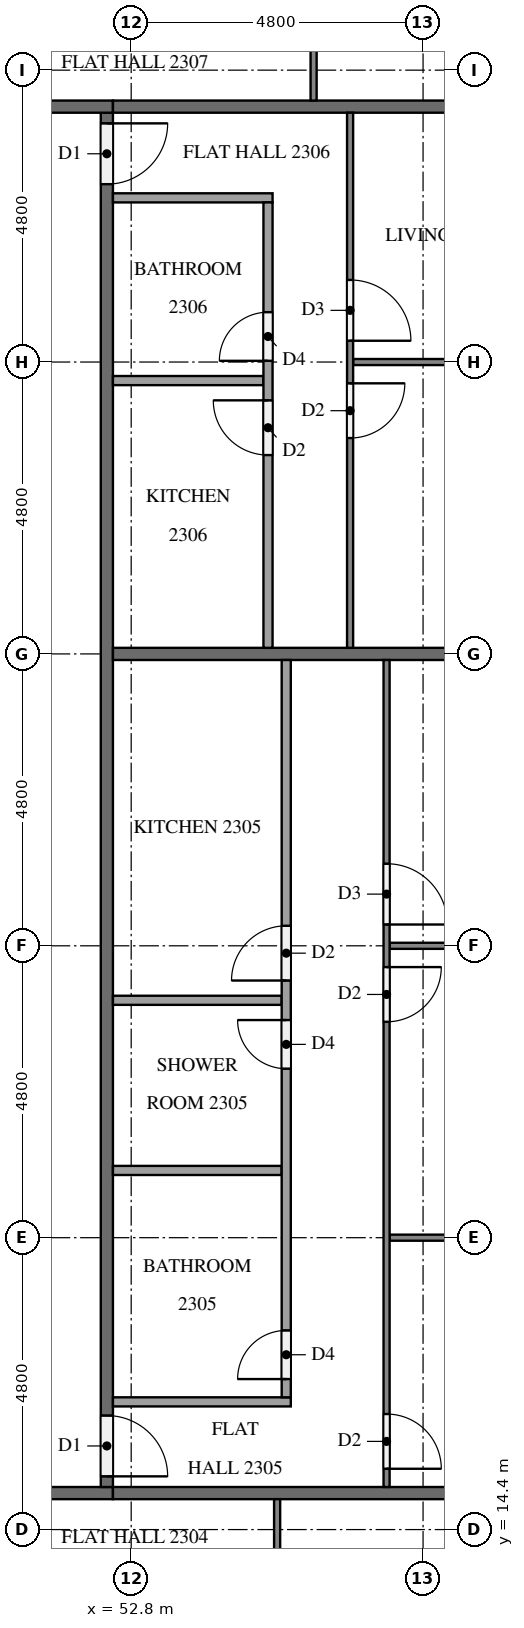
"""IFC4 building model, lengths in metres.
Left out: names, types, materials, properties, quantities, classifications, styles, units other than length and angle.
Written with IfcOpenShell. Run it as: python <this file> out.ifc"""

import sys

from ifc_helpers import new_model, si_unit, direction, frame, frame_2d, origin, place, context, subcontext, project, spatial, rectangle, extrude, element, fill, save


model = new_model("IFC4")
c1 = context("Model", 3, precision=1e-05, world=origin(), true_north=direction((0.0, 1.0)))
c2 = subcontext(c1, "Body", "Model", "MODEL_VIEW")
j1 = project(units=[si_unit("LENGTHUNIT", "METRE"), si_unit("PLANEANGLEUNIT", "RADIAN")], contexts=[c1])
p1 = place(None, origin())
s1 = spatial("IfcSite", under=j1, at=p1, CompositionType="ELEMENT")
p2 = place(p1, origin())
s2 = spatial("IfcBuilding", under=s1, at=p2, CompositionType="ELEMENT")
p3 = place(p2, frame((0.0, 0.0, 92.7)))
s3 = spatial("IfcBuildingStorey", under=s2, at=p3, CompositionType="ELEMENT", Elevation=92.7)
p4 = place(p3, frame((50.3, 15.0, 0.0), z_axis=(0.0, 0.0, 1.0), x_axis=(1.0, 0.0, 0.0)))
e1 = element("IfcWall", 1, at=p4, inside=s3, PredefinedType="PARTITIONING", context=c2, shape_type="SweptSolid", body=[
    extrude(rectangle(XDim=2.2, YDim=0.2, at=frame_2d((1.1, 0.0))), origin(), (0.0, 0.0, 1.0), 3.2),
])
p5 = place(p3, frame((52.4, 37.7, 0.0), z_axis=(0.0, 0.0, 1.0), x_axis=(0.0, -1.0, 0.0)))
e2 = element("IfcWall", 2, at=p5, inside=s3, PredefinedType="PARTITIONING", context=c2, shape_type="SweptSolid", body=[
    extrude(rectangle(XDim=22.6, YDim=0.2, at=frame_2d((11.3, 0.0))), origin(), (0.0, 0.0, 1.0), 3.2),
])
p6 = place(p5, frame((21.425, 0.0, 0.0)))
e3 = element("IfcOpeningElement", 3, at=p6, cuts=e2, PredefinedType="OPENING", context=c2, shape_type="SweptSolid", body=[
    extrude(rectangle(XDim=1.0, YDim=2.1, at=frame_2d((0.5, 1.05))), frame((0.0, 0.11, 0.0), z_axis=(0.0, -1.0, 0.0), x_axis=(1.0, 0.0, 0.0)), (0.0, 0.0, 1.0), 0.22),
])
p7 = place(p5, frame((0.175, 0.0, 0.0)))
e4 = element("IfcOpeningElement", 4, at=p7, cuts=e2, PredefinedType="OPENING", context=c2, shape_type="SweptSolid", body=[
    extrude(rectangle(XDim=1.0, YDim=2.1, at=frame_2d((0.5, 1.05))), frame((0.0, 0.11, 0.0), z_axis=(0.0, -1.0, 0.0), x_axis=(1.0, 0.0, 0.0)), (0.0, 0.0, 1.0), 0.22),
])
p8 = place(p3, frame((52.5, 37.8, 0.0), z_axis=(0.0, 0.0, 1.0), x_axis=(-1.0, 0.0, 0.0)))
e5 = element("IfcWall", 5, at=p8, inside=s3, PredefinedType="PARTITIONING", context=c2, shape_type="SweptSolid", body=[
    extrude(rectangle(XDim=2.2, YDim=0.2, at=frame_2d((1.1, 0.0))), origin(), (0.0, 0.0, 1.0), 3.2),
])
p9 = place(p3, frame((52.5, 15.0, 0.0), z_axis=(0.0, 0.0, 1.0), x_axis=(1.0, 0.0, 0.0)))
e6 = element("IfcWall", 6, at=p9, inside=s3, PredefinedType="PARTITIONING", context=c2, shape_type="SweptSolid", body=[
    extrude(rectangle(XDim=9.8, YDim=0.2, at=frame_2d((4.9, 0.0))), origin(), (0.0, 0.0, 1.0), 3.2),
])
for number, where, z_axis, x_axis in (
    (7, (52.5, 28.8, 0.0), (0.0, 0.0, 1.0), (1.0, 0.0, 0.0)),
    (8, (52.5, 37.8, 0.0), (0.0, 0.0, 1.0), (1.0, 0.0, 0.0)),
):
    element("IfcWall", number, at=place(p3, frame(where, z_axis=z_axis, x_axis=x_axis)), inside=s3, PredefinedType="PARTITIONING", context=c2, shape_type="SweptSolid", body=[
        extrude(rectangle(XDim=9.475, YDim=0.2, at=frame_2d((4.738, 0.0))), origin(), (0.0, 0.0, 1.0), 3.2),
    ])
p10 = place(p3, frame((55.2, 14.9, 0.0), z_axis=(0.0, 0.0, 1.0), x_axis=(0.0, -1.0, 0.0)))
e9 = element("IfcWall", 9, at=p10, inside=s3, PredefinedType="PARTITIONING", context=c2, shape_type="SweptSolid", body=[
    extrude(rectangle(XDim=10.0, YDim=0.1, at=frame_2d((5.0, 0.0))), origin(), (0.0, 0.0, 1.0), 3.2),
])
p11 = place(p10, frame((4.05, 0.0, 0.0)))
e10 = element("IfcOpeningElement", 10, at=p11, cuts=e9, PredefinedType="OPENING", context=c2, shape_type="SweptSolid", body=[
    extrude(rectangle(XDim=0.9, YDim=2.1, at=frame_2d((0.45, 1.05))), frame((0.0, 0.06, 0.0), z_axis=(0.0, -1.0, 0.0), x_axis=(1.0, 0.0, 0.0)), (0.0, 0.0, 1.0), 0.12),
])
p12 = place(p10, frame((5.65, 0.0, 0.0)))
e11 = element("IfcOpeningElement", 11, at=p12, cuts=e9, PredefinedType="OPENING", context=c2, shape_type="SweptSolid", body=[
    extrude(rectangle(XDim=1.0, YDim=2.1, at=frame_2d((0.5, 1.05))), frame((0.0, 0.06, 0.0), z_axis=(0.0, -1.0, 0.0), x_axis=(1.0, 0.0, 0.0)), (0.0, 0.0, 1.0), 0.12),
])
p13 = place(p3, frame((57.05, 19.2, 0.0), z_axis=(0.0, 0.0, 1.0), x_axis=(1.0, 0.0, 0.0)))
e12 = element("IfcWall", 12, at=p13, inside=s3, PredefinedType="PARTITIONING", context=c2, shape_type="SweptSolid", body=[
    extrude(rectangle(XDim=4.925, YDim=0.1, at=frame_2d((2.462, 0.0))), origin(), (0.0, 0.0, 1.0), 3.2),
])
p14 = place(p3, frame((57.05, 24.0, 0.0), z_axis=(0.0, 0.0, 1.0), x_axis=(1.0, 0.0, 0.0)))
e13 = element("IfcWall", 13, at=p14, inside=s3, PredefinedType="PARTITIONING", context=c2, shape_type="SweptSolid", body=[
    extrude(rectangle(XDim=5.25, YDim=0.1, at=frame_2d((2.625, 0.0))), origin(), (0.0, 0.0, 1.0), 3.2),
])
p15 = place(p3, frame((57.0, 28.7, 0.0), z_axis=(0.0, 0.0, 1.0), x_axis=(0.0, -1.0, 0.0)))
e14 = element("IfcWall", 14, at=p15, inside=s3, PredefinedType="PARTITIONING", context=c2, shape_type="SweptSolid", body=[
    extrude(rectangle(XDim=13.6, YDim=0.1, at=frame_2d((6.8, 0.0))), origin(), (0.0, 0.0, 1.0), 3.2),
])
p16 = place(p15, frame((12.4, 0.0, 0.0)))
e15 = element("IfcOpeningElement", 15, at=p16, cuts=e14, PredefinedType="OPENING", context=c2, shape_type="SweptSolid", body=[
    extrude(rectangle(XDim=0.9, YDim=2.1, at=frame_2d((0.45, 1.05))), frame((0.0, 0.06, 0.0), z_axis=(0.0, -1.0, 0.0), x_axis=(1.0, 0.0, 0.0)), (0.0, 0.0, 1.0), 0.12),
])
p17 = place(p15, frame((5.05, 0.0, 0.0)))
e16 = element("IfcOpeningElement", 16, at=p17, cuts=e14, PredefinedType="OPENING", context=c2, shape_type="SweptSolid", body=[
    extrude(rectangle(XDim=0.9, YDim=2.1, at=frame_2d((0.45, 1.05))), frame((0.0, 0.06, 0.0), z_axis=(0.0, -1.0, 0.0), x_axis=(1.0, 0.0, 0.0)), (0.0, 0.0, 1.0), 0.12),
])
p18 = place(p15, frame((3.35, 0.0, 0.0)))
e17 = element("IfcOpeningElement", 17, at=p18, cuts=e14, PredefinedType="OPENING", context=c2, shape_type="SweptSolid", body=[
    extrude(rectangle(XDim=1.0, YDim=2.1, at=frame_2d((0.5, 1.05))), frame((0.0, 0.06, 0.0), z_axis=(0.0, -1.0, 0.0), x_axis=(1.0, 0.0, 0.0)), (0.0, 0.0, 1.0), 0.12),
])
for number, where, z_axis, x_axis in (
    (18, (52.5, 20.306, 0.0), (0.0, 0.0, 1.0), (1.0, 0.0, 0.0)),
    (19, (52.5, 23.104, 0.0), (0.0, 0.0, 1.0), (1.0, 0.0, 0.0)),
):
    element("IfcWall", number, at=place(p3, frame(where, z_axis=z_axis, x_axis=x_axis)), inside=s3, PredefinedType="PARTITIONING", context=c2, shape_type="SweptSolid", body=[
        extrude(rectangle(XDim=2.775, YDim=0.15, at=frame_2d((1.387, 0.0))), origin(), (0.0, 0.0, 1.0), 3.2),
    ])
p19 = place(p3, frame((52.5, 16.5, 0.0), z_axis=(0.0, 0.0, 1.0), x_axis=(1.0, 0.0, 0.0)))
e20 = element("IfcWall", 20, at=p19, inside=s3, PredefinedType="PARTITIONING", context=c2, shape_type="SweptSolid", body=[
    extrude(rectangle(XDim=2.925, YDim=0.15, at=frame_2d((1.462, 0.0))), origin(), (0.0, 0.0, 1.0), 3.2),
])
p20 = place(p3, frame((55.35, 16.575, 0.0), z_axis=(0.0, 0.0, 1.0), x_axis=(0.0, 1.0, 0.0)))
e21 = element("IfcWall", 21, at=p20, inside=s3, PredefinedType="PARTITIONING", context=c2, shape_type="SweptSolid", body=[
    extrude(rectangle(XDim=12.125, YDim=0.15, at=frame_2d((6.062, 0.0))), origin(), (0.0, 0.0, 1.0), 3.2),
])
p21 = place(p20, frame((0.3, 0.0, 0.0)))
e22 = element("IfcOpeningElement", 22, at=p21, cuts=e21, PredefinedType="OPENING", context=c2, shape_type="SweptSolid", body=[
    extrude(rectangle(XDim=0.8, YDim=2.1, at=frame_2d((0.4, 1.05))), frame((0.0, 0.085, 0.0), z_axis=(0.0, -1.0, 0.0), x_axis=(1.0, 0.0, 0.0)), (0.0, 0.0, 1.0), 0.17),
])
p22 = place(p20, frame((5.404, 0.0, 0.0)))
e23 = element("IfcOpeningElement", 23, at=p22, cuts=e21, PredefinedType="OPENING", context=c2, shape_type="SweptSolid", body=[
    extrude(rectangle(XDim=0.8, YDim=2.1, at=frame_2d((0.4, 1.05))), frame((0.0, 0.085, 0.0), z_axis=(0.0, -1.0, 0.0), x_axis=(1.0, 0.0, 0.0)), (0.0, 0.0, 1.0), 0.17),
])
p23 = place(p20, frame((6.854, 0.0, 0.0)))
e24 = element("IfcOpeningElement", 24, at=p23, cuts=e21, PredefinedType="OPENING", context=c2, shape_type="SweptSolid", body=[
    extrude(rectangle(XDim=0.9, YDim=2.1, at=frame_2d((0.45, 1.05))), frame((0.0, 0.085, 0.0), z_axis=(0.0, -1.0, 0.0), x_axis=(1.0, 0.0, 0.0)), (0.0, 0.0, 1.0), 0.17),
])
p24 = place(p3, frame((56.45, 33.6, 0.0), z_axis=(0.0, 0.0, 1.0), x_axis=(1.0, 0.0, 0.0)))
e25 = element("IfcWall", 25, at=p24, inside=s3, PredefinedType="PARTITIONING", context=c2, shape_type="SweptSolid", body=[
    extrude(rectangle(XDim=5.85, YDim=0.1, at=frame_2d((2.925, 0.0))), origin(), (0.0, 0.0, 1.0), 3.2),
])
p25 = place(p3, frame((56.4, 37.7, 0.0), z_axis=(0.0, 0.0, 1.0), x_axis=(0.0, -1.0, 0.0)))
e26 = element("IfcWall", 26, at=p25, inside=s3, PredefinedType="PARTITIONING", context=c2, shape_type="SweptSolid", body=[
    extrude(rectangle(XDim=8.8, YDim=0.1, at=frame_2d((4.4, 0.0))), origin(), (0.0, 0.0, 1.0), 3.2),
])
p26 = place(p25, frame((2.75, 0.0, 0.0)))
e27 = element("IfcOpeningElement", 27, at=p26, cuts=e26, PredefinedType="OPENING", context=c2, shape_type="SweptSolid", body=[
    extrude(rectangle(XDim=1.0, YDim=2.1, at=frame_2d((0.5, 1.05))), frame((0.0, 0.06, 0.0), z_axis=(0.0, -1.0, 0.0), x_axis=(1.0, 0.0, 0.0)), (0.0, 0.0, 1.0), 0.12),
])
p27 = place(p25, frame((4.45, 0.0, 0.0)))
e28 = element("IfcOpeningElement", 28, at=p27, cuts=e26, PredefinedType="OPENING", context=c2, shape_type="SweptSolid", body=[
    extrude(rectangle(XDim=0.9, YDim=2.1, at=frame_2d((0.45, 1.05))), frame((0.0, 0.06, 0.0), z_axis=(0.0, -1.0, 0.0), x_axis=(1.0, 0.0, 0.0)), (0.0, 0.0, 1.0), 0.12),
])
p28 = place(p3, frame((52.5, 33.295, 0.0), z_axis=(0.0, 0.0, 1.0), x_axis=(1.0, 0.0, 0.0)))
e29 = element("IfcWall", 29, at=p28, inside=s3, PredefinedType="PARTITIONING", context=c2, shape_type="SweptSolid", body=[
    extrude(rectangle(XDim=2.475, YDim=0.15, at=frame_2d((1.238, 0.0))), origin(), (0.0, 0.0, 1.0), 3.2),
])
p29 = place(p3, frame((52.5, 36.3, 0.0), z_axis=(0.0, 0.0, 1.0), x_axis=(1.0, 0.0, 0.0)))
e30 = element("IfcWall", 30, at=p29, inside=s3, PredefinedType="PARTITIONING", context=c2, shape_type="SweptSolid", body=[
    extrude(rectangle(XDim=2.625, YDim=0.15, at=frame_2d((1.312, 0.0))), origin(), (0.0, 0.0, 1.0), 3.2),
])
p30 = place(p3, frame((55.05, 28.9, 0.0), z_axis=(0.0, 0.0, 1.0), x_axis=(0.0, 1.0, 0.0)))
e31 = element("IfcWall", 31, at=p30, inside=s3, PredefinedType="PARTITIONING", context=c2, shape_type="SweptSolid", body=[
    extrude(rectangle(XDim=7.325, YDim=0.15, at=frame_2d((3.663, 0.0))), origin(), (0.0, 0.0, 1.0), 3.2),
])
p31 = place(p30, frame((4.72, 0.0, 0.0)))
e32 = element("IfcOpeningElement", 32, at=p31, cuts=e31, PredefinedType="OPENING", context=c2, shape_type="SweptSolid", body=[
    extrude(rectangle(XDim=0.8, YDim=2.1, at=frame_2d((0.4, 1.05))), frame((0.0, 0.085, 0.0), z_axis=(0.0, -1.0, 0.0), x_axis=(1.0, 0.0, 0.0)), (0.0, 0.0, 1.0), 0.17),
])
p32 = place(p30, frame((3.17, 0.0, 0.0)))
e33 = element("IfcOpeningElement", 33, at=p32, cuts=e31, PredefinedType="OPENING", context=c2, shape_type="SweptSolid", body=[
    extrude(rectangle(XDim=0.9, YDim=2.1, at=frame_2d((0.45, 1.05))), frame((0.0, 0.085, 0.0), z_axis=(0.0, -1.0, 0.0), x_axis=(1.0, 0.0, 0.0)), (0.0, 0.0, 1.0), 0.17),
])
p33 = place(p3, frame((55.8, 52.7, 0.0), z_axis=(0.0, 0.0, 1.0), x_axis=(0.0, -1.0, 0.0)))
e34 = element("IfcWall", 34, at=p33, inside=s3, PredefinedType="PARTITIONING", context=c2, shape_type="SweptSolid", body=[
    extrude(rectangle(XDim=14.8, YDim=0.1, at=frame_2d((7.4, 0.0))), origin(), (0.0, 0.0, 1.0), 3.2),
])
p34 = place(p33, frame((9.85, 0.0, 0.0)))
e35 = element("IfcOpeningElement", 35, at=p34, cuts=e34, PredefinedType="OPENING", context=c2, shape_type="SweptSolid", body=[
    extrude(rectangle(XDim=0.9, YDim=2.1, at=frame_2d((0.45, 1.05))), frame((0.0, 0.06, 0.0), z_axis=(0.0, -1.0, 0.0), x_axis=(1.0, 0.0, 0.0)), (0.0, 0.0, 1.0), 0.12),
])
p35 = place(p33, frame((8.25, 0.0, 0.0)))
e36 = element("IfcOpeningElement", 36, at=p35, cuts=e34, PredefinedType="OPENING", context=c2, shape_type="SweptSolid", body=[
    extrude(rectangle(XDim=0.9, YDim=2.1, at=frame_2d((0.45, 1.05))), frame((0.0, 0.06, 0.0), z_axis=(0.0, -1.0, 0.0), x_axis=(1.0, 0.0, 0.0)), (0.0, 0.0, 1.0), 0.12),
])
p36 = place(p33, frame((0.5, 0.0, 0.0)))
e37 = element("IfcOpeningElement", 37, at=p36, cuts=e34, PredefinedType="OPENING", context=c2, shape_type="SweptSolid", body=[
    extrude(rectangle(XDim=1.0, YDim=2.1, at=frame_2d((0.5, 1.05))), frame((0.0, 0.06, 0.0), z_axis=(0.0, -1.0, 0.0), x_axis=(1.0, 0.0, 0.0)), (0.0, 0.0, 1.0), 0.12),
])
p37 = place(p6, origin())
e38 = element("IfcDoor", 38, at=p37, inside=s3, OperationType="SINGLE_SWING_RIGHT", PredefinedType="DOOR", context=c2, shape_type="SweptSolid", body=[
    extrude(rectangle(XDim=1.0, YDim=2.1, at=frame_2d((0.5, 1.05))), frame((0.0, 0.025, 0.0), z_axis=(0.0, -1.0, 0.0), x_axis=(1.0, 0.0, 0.0)), (0.0, 0.0, 1.0), 0.05),
])
fill(e3, e38)
p38 = place(p7, origin())
e39 = element("IfcDoor", 39, at=p38, inside=s3, OperationType="SINGLE_SWING_LEFT", PredefinedType="DOOR", context=c2, shape_type="SweptSolid", body=[
    extrude(rectangle(XDim=1.0, YDim=2.1, at=frame_2d((0.5, 1.05))), frame((0.0, 0.025, 0.0), z_axis=(0.0, -1.0, 0.0), x_axis=(1.0, 0.0, 0.0)), (0.0, 0.0, 1.0), 0.05),
])
fill(e4, e39)
p39 = place(p16, origin())
e40 = element("IfcDoor", 40, at=p39, inside=s3, OperationType="SINGLE_SWING_RIGHT", PredefinedType="DOOR", context=c2, shape_type="SweptSolid", body=[
    extrude(rectangle(XDim=0.9, YDim=2.1, at=frame_2d((0.45, 1.05))), frame((0.0, 0.025, 0.0), z_axis=(0.0, -1.0, 0.0), x_axis=(1.0, 0.0, 0.0)), (0.0, 0.0, 1.0), 0.05),
])
fill(e15, e40)
p40 = place(p17, origin())
e41 = element("IfcDoor", 41, at=p40, inside=s3, OperationType="SINGLE_SWING_LEFT", PredefinedType="DOOR", context=c2, shape_type="SweptSolid", body=[
    extrude(rectangle(XDim=0.9, YDim=2.1, at=frame_2d((0.45, 1.05))), frame((0.0, 0.025, 0.0), z_axis=(0.0, -1.0, 0.0), x_axis=(1.0, 0.0, 0.0)), (0.0, 0.0, 1.0), 0.05),
])
fill(e16, e41)
p41 = place(p18, origin())
e42 = element("IfcDoor", 42, at=p41, inside=s3, OperationType="SINGLE_SWING_RIGHT", PredefinedType="DOOR", context=c2, shape_type="SweptSolid", body=[
    extrude(rectangle(XDim=1.0, YDim=2.1, at=frame_2d((0.5, 1.05))), frame((0.0, 0.025, 0.0), z_axis=(0.0, -1.0, 0.0), x_axis=(1.0, 0.0, 0.0)), (0.0, 0.0, 1.0), 0.05),
])
fill(e17, e42)
p42 = place(p21, origin())
e43 = element("IfcDoor", 43, at=p42, inside=s3, OperationType="SINGLE_SWING_LEFT", PredefinedType="DOOR", context=c2, shape_type="SweptSolid", body=[
    extrude(rectangle(XDim=0.8, YDim=2.1, at=frame_2d((0.4, 1.05))), frame((0.0, 0.025, 0.0), z_axis=(0.0, -1.0, 0.0), x_axis=(1.0, 0.0, 0.0)), (0.0, 0.0, 1.0), 0.05),
])
fill(e22, e43)
p43 = place(p22, origin())
e44 = element("IfcDoor", 44, at=p43, inside=s3, OperationType="SINGLE_SWING_RIGHT", PredefinedType="DOOR", context=c2, shape_type="SweptSolid", body=[
    extrude(rectangle(XDim=0.8, YDim=2.1, at=frame_2d((0.4, 1.05))), frame((0.0, 0.025, 0.0), z_axis=(0.0, -1.0, 0.0), x_axis=(1.0, 0.0, 0.0)), (0.0, 0.0, 1.0), 0.05),
])
fill(e23, e44)
p44 = place(p23, origin())
e45 = element("IfcDoor", 45, at=p44, inside=s3, OperationType="SINGLE_SWING_LEFT", PredefinedType="DOOR", context=c2, shape_type="SweptSolid", body=[
    extrude(rectangle(XDim=0.9, YDim=2.1, at=frame_2d((0.45, 1.05))), frame((0.0, 0.025, 0.0), z_axis=(0.0, -1.0, 0.0), x_axis=(1.0, 0.0, 0.0)), (0.0, 0.0, 1.0), 0.05),
])
fill(e24, e45)
p45 = place(p26, origin())
e46 = element("IfcDoor", 46, at=p45, inside=s3, OperationType="SINGLE_SWING_RIGHT", PredefinedType="DOOR", context=c2, shape_type="SweptSolid", body=[
    extrude(rectangle(XDim=1.0, YDim=2.1, at=frame_2d((0.5, 1.05))), frame((0.0, 0.025, 0.0), z_axis=(0.0, -1.0, 0.0), x_axis=(1.0, 0.0, 0.0)), (0.0, 0.0, 1.0), 0.05),
])
fill(e27, e46)
p46 = place(p27, origin())
e47 = element("IfcDoor", 47, at=p46, inside=s3, OperationType="SINGLE_SWING_LEFT", PredefinedType="DOOR", context=c2, shape_type="SweptSolid", body=[
    extrude(rectangle(XDim=0.9, YDim=2.1, at=frame_2d((0.45, 1.05))), frame((0.0, 0.025, 0.0), z_axis=(0.0, -1.0, 0.0), x_axis=(1.0, 0.0, 0.0)), (0.0, 0.0, 1.0), 0.05),
])
fill(e28, e47)
p47 = place(p31, origin())
e48 = element("IfcDoor", 48, at=p47, inside=s3, OperationType="SINGLE_SWING_LEFT", PredefinedType="DOOR", context=c2, shape_type="SweptSolid", body=[
    extrude(rectangle(XDim=0.8, YDim=2.1, at=frame_2d((0.4, 1.05))), frame((0.0, 0.025, 0.0), z_axis=(0.0, -1.0, 0.0), x_axis=(1.0, 0.0, 0.0)), (0.0, 0.0, 1.0), 0.05),
])
fill(e32, e48)
p48 = place(p32, origin())
e49 = element("IfcDoor", 49, at=p48, inside=s3, OperationType="SINGLE_SWING_RIGHT", PredefinedType="DOOR", context=c2, shape_type="SweptSolid", body=[
    extrude(rectangle(XDim=0.9, YDim=2.1, at=frame_2d((0.45, 1.05))), frame((0.0, 0.025, 0.0), z_axis=(0.0, -1.0, 0.0), x_axis=(1.0, 0.0, 0.0)), (0.0, 0.0, 1.0), 0.05),
])
fill(e33, e49)
save(model, sys.argv[1])
